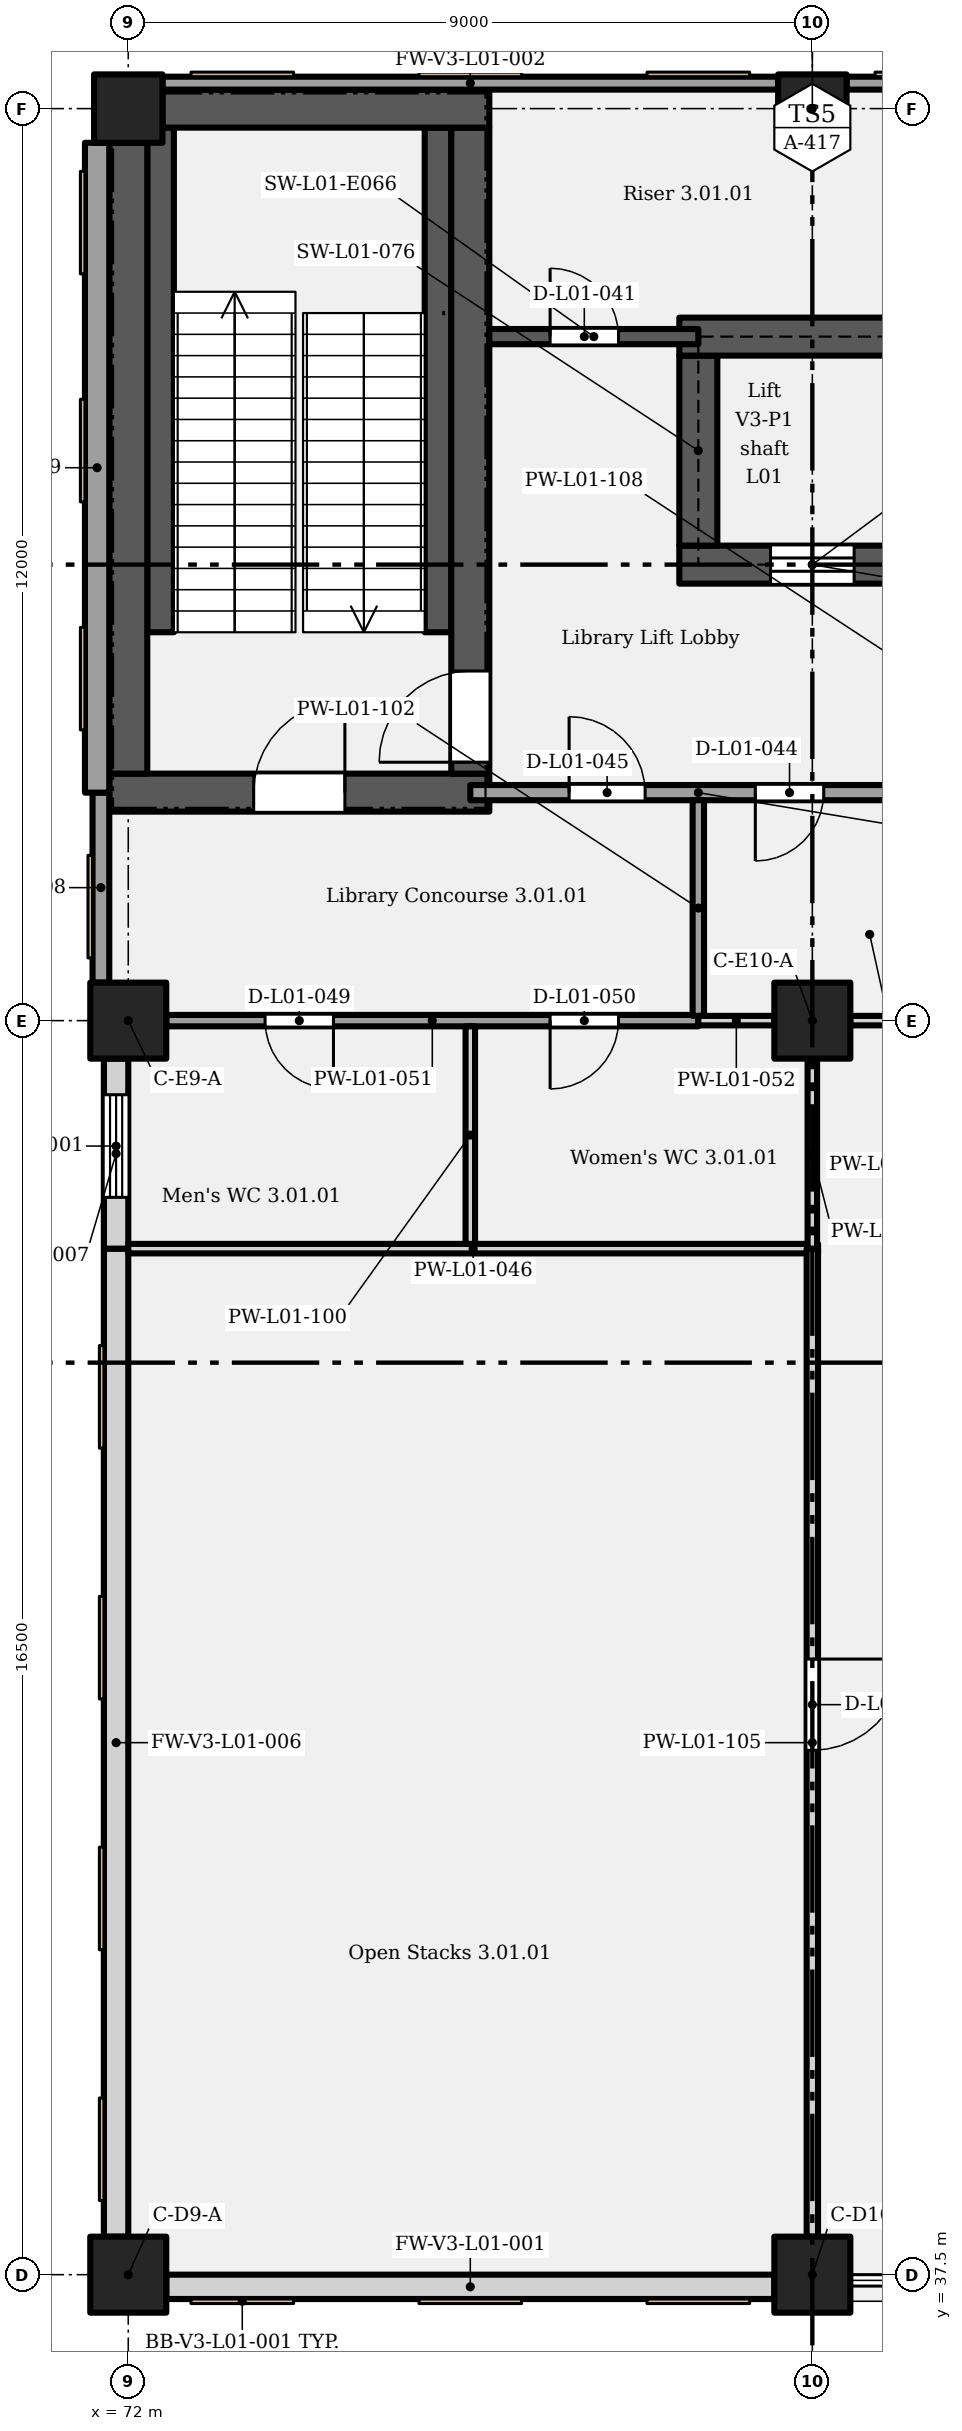
"""IFC4 building model, lengths in metres.
Left out: names, types, materials, properties, quantities, classifications, styles, units other than length and angle.
Written with IfcOpenShell. Run it as: python <this file> out.ifc"""

import sys

from ifc_helpers import new_model, si_unit, direction, frame, frame_2d, origin, origin_2d, place, context, subcontext, project, spatial, rectangle, extrude, element, fill, save


model = new_model("IFC4")
c1 = context("Model", 3, precision=1e-05, world=origin(), true_north=direction((0.0, 1.0)))
c2 = subcontext(c1, "Body", "Model", "MODEL_VIEW")
j1 = project(units=[si_unit("LENGTHUNIT", "METRE"), si_unit("PLANEANGLEUNIT", "RADIAN")], contexts=[c1])
p1 = place(None, origin())
s1 = spatial("IfcSite", under=j1, at=p1, CompositionType="ELEMENT")
p2 = place(p1, origin())
s2 = spatial("IfcBuilding", under=s1, at=p2, CompositionType="ELEMENT")
p3 = place(p2, frame((0.0, 0.0, 6.6)))
s3 = spatial("IfcBuildingStorey", under=s2, at=p3, CompositionType="ELEMENT", Elevation=6.6)
for number, where, z_axis, x_axis in (
    (1, (72.0, 37.5, 0.0), (0.0, 0.0, 1.0), (1.0, 0.0, 0.0)),
    (2, (81.0, 37.5, 0.0), (0.0, 0.0, 1.0), (1.0, 0.0, 0.0)),
    (3, (72.0, 54.0, 0.0), (0.0, 0.0, 1.0), (1.0, 0.0, 0.0)),
    (4, (81.0, 54.0, 0.0), (0.0, 0.0, 1.0), (1.0, 0.0, 0.0)),
):
    element("IfcColumn", number, at=place(p3, frame(where, z_axis=z_axis, x_axis=x_axis)), inside=s3, PredefinedType="COLUMN", context=c2, shape_type="SweptSolid", body=[
        extrude(rectangle(XDim=1.0, YDim=1.0, at=origin_2d()), origin(), (0.0, 0.0, 1.0), 5.4),
    ])
for number, where, z_axis, x_axis in (
    (5, (72.0, 66.0, 0.0), (0.0, 0.0, 1.0), (1.0, 0.0, 0.0)),
    (6, (81.0, 66.0, 0.0), (0.0, 0.0, 1.0), (1.0, 0.0, 0.0)),
):
    element("IfcColumn", number, at=place(p3, frame(where, z_axis=z_axis, x_axis=x_axis)), inside=s3, PredefinedType="COLUMN", context=c2, shape_type="SweptSolid", body=[
        extrude(rectangle(XDim=0.9, YDim=0.9, at=origin_2d()), origin(), (0.0, 0.0, 1.0), 5.4),
    ])
p4 = place(p3, frame((71.75, 57.0, 0.0), z_axis=(0.0, 0.0, 1.0), x_axis=(1.0, 0.0, 0.0)))
e7 = element("IfcWall", 7, at=p4, inside=s3, PredefinedType="SHEAR", context=c2, shape_type="SweptSolid", body=[
    extrude(rectangle(XDim=5.0, YDim=0.5, at=frame_2d((2.5, 0.0))), origin(), (0.0, 0.0, 1.0), 5.1),
])
p5 = place(p4, frame((1.9, 0.0, 0.0)))
e8 = element("IfcOpeningElement", 8, at=p5, cuts=e7, PredefinedType="OPENING", context=c2, shape_type="SweptSolid", body=[
    extrude(rectangle(XDim=1.2, YDim=2.1, at=frame_2d((0.6, 1.05))), frame((0.0, 0.26, 0.0), z_axis=(0.0, -1.0, 0.0), x_axis=(1.0, 0.0, 0.0)), (0.0, 0.0, 1.0), 0.52),
])
p6 = place(p3, frame((72.0, 57.25, 0.0), z_axis=(0.0, 0.0, 1.0), x_axis=(0.0, 1.0, 0.0)))
e9 = element("IfcWall", 9, at=p6, inside=s3, PredefinedType="SHEAR", context=c2, shape_type="SweptSolid", body=[
    extrude(rectangle(XDim=8.3, YDim=0.5, at=frame_2d((4.15, 0.0))), origin(), (0.0, 0.0, 1.0), 5.1),
])
p7 = place(p3, frame((76.5, 57.25, 0.0), z_axis=(0.0, 0.0, 1.0), x_axis=(0.0, 1.0, 0.0)))
e10 = element("IfcWall", 10, at=p7, inside=s3, PredefinedType="SHEAR", context=c2, shape_type="SweptSolid", body=[
    extrude(rectangle(XDim=8.5, YDim=0.5, at=frame_2d((4.25, 0.0))), origin(), (0.0, 0.0, 1.0), 5.1),
])
p8 = place(p7, frame((0.15, 0.0, 0.0)))
e11 = element("IfcOpeningElement", 11, at=p8, cuts=e10, PredefinedType="OPENING", context=c2, shape_type="SweptSolid", body=[
    extrude(rectangle(XDim=1.2, YDim=2.1, at=frame_2d((0.6, 1.05))), frame((0.0, 0.26, 0.0), z_axis=(0.0, -1.0, 0.0), x_axis=(1.0, 0.0, 0.0)), (0.0, 0.0, 1.0), 0.52),
])
p9 = place(p3, frame((79.25, 60.0, 0.0), z_axis=(0.0, 0.0, 1.0), x_axis=(1.0, 0.0, 0.0)))
e12 = element("IfcWall", 12, at=p9, inside=s3, PredefinedType="SHEAR", context=c2, shape_type="SweptSolid", body=[
    extrude(rectangle(XDim=3.5, YDim=0.5, at=frame_2d((1.75, 0.0))), origin(), (0.0, 0.0, 1.0), 5.1),
])
p10 = place(p9, frame((1.2, 0.0, 0.0)))
e13 = element("IfcOpeningElement", 13, at=p10, cuts=e12, PredefinedType="OPENING", context=c2, shape_type="SweptSolid", body=[
    extrude(rectangle(XDim=1.1, YDim=2.1, at=frame_2d((0.55, 1.05))), frame((0.0, 0.26, 0.0), z_axis=(0.0, -1.0, 0.0), x_axis=(1.0, 0.0, 0.0)), (0.0, 0.0, 1.0), 0.52),
])
p11 = place(p3, frame((79.5, 60.25, 0.0), z_axis=(0.0, 0.0, 1.0), x_axis=(0.0, 1.0, 0.0)))
e14 = element("IfcWall", 14, at=p11, inside=s3, PredefinedType="SHEAR", context=c2, shape_type="SweptSolid", body=[
    extrude(rectangle(XDim=2.5, YDim=0.5, at=frame_2d((1.25, 0.0))), origin(), (0.0, 0.0, 1.0), 5.1),
])
p12 = place(p3, frame((79.25, 63.0, 0.0), z_axis=(0.0, 0.0, 1.0), x_axis=(1.0, 0.0, 0.0)))
e15 = element("IfcWall", 15, at=p12, inside=s3, PredefinedType="SHEAR", context=c2, shape_type="SweptSolid", body=[
    extrude(rectangle(XDim=6.0, YDim=0.5, at=frame_2d((3.0, 0.0))), origin(), (0.0, 0.0, 1.0), 5.1),
])
p13 = place(p12, frame((4.2, 0.0, 0.0)))
e16 = element("IfcOpeningElement", 16, at=p13, cuts=e15, PredefinedType="OPENING", context=c2, shape_type="SweptSolid", body=[
    extrude(rectangle(XDim=1.1, YDim=2.1, at=frame_2d((0.55, 1.05))), frame((0.0, 0.26, 0.0), z_axis=(0.0, -1.0, 0.0), x_axis=(1.0, 0.0, 0.0)), (0.0, 0.0, 1.0), 0.52),
])
p14 = place(p3, frame((72.45, 66.0, 0.0), z_axis=(0.0, 0.0, 1.0), x_axis=(1.0, 0.0, 0.0)))
e17 = element("IfcWall", 17, at=p14, inside=s3, PredefinedType="SHEAR", context=c2, shape_type="SweptSolid", body=[
    extrude(rectangle(XDim=4.3, YDim=0.5, at=frame_2d((2.15, 0.0))), origin(), (0.0, 0.0, 1.0), 5.1),
])
p15 = place(p3, frame((72.5, 37.34, 0.0), z_axis=(0.0, 0.0, 1.0), x_axis=(1.0, 0.0, 0.0)))
e18 = element("IfcWall", 18, at=p15, inside=s3, PredefinedType="SOLIDWALL", context=c2, shape_type="SweptSolid", body=[
    extrude(rectangle(XDim=8.0, YDim=0.32, at=frame_2d((4.0, 0.0))), origin(), (0.0, 0.0, 1.0), 5.1),
])
for number, where, z_axis, x_axis in (
    (19, (72.45, 66.335, 0.0), (0.0, 0.0, 1.0), (1.0, 0.0, 0.0)),
    (20, (81.45, 66.335, 0.0), (0.0, 0.0, 1.0), (1.0, 0.0, 0.0)),
):
    element("IfcWall", number, at=place(p3, frame(where, z_axis=z_axis, x_axis=x_axis)), inside=s3, PredefinedType="SOLIDWALL", context=c2, shape_type="SweptSolid", body=[
        extrude(rectangle(XDim=8.1, YDim=0.17, at=frame_2d((4.05, 0.0))), origin(), (0.0, 0.0, 1.0), 5.1),
    ])
p16 = place(p3, frame((71.84, 38.0, 0.0), z_axis=(0.0, 0.0, 1.0), x_axis=(0.0, 1.0, 0.0)))
e21 = element("IfcWall", 21, at=p16, inside=s3, PredefinedType="SOLIDWALL", context=c2, shape_type="SweptSolid", body=[
    extrude(rectangle(XDim=13.0, YDim=0.32, at=frame_2d((6.5, 0.0))), origin(), (0.0, 0.0, 1.0), 5.1),
])
p17 = place(p3, frame((71.84, 51.0, 0.0), z_axis=(0.0, 0.0, 1.0), x_axis=(0.0, 1.0, 0.0)))
e22 = element("IfcWall", 22, at=p17, inside=s3, PredefinedType="SOLIDWALL", context=c2, shape_type="SweptSolid", body=[
    extrude(rectangle(XDim=2.5, YDim=0.32, at=frame_2d((1.25, 0.0))), origin(), (0.0, 0.0, 1.0), 5.1),
])
p18 = place(p17, frame((0.675, 0.0, 1.2)))
e23 = element("IfcOpeningElement", 23, at=p18, cuts=e22, PredefinedType="OPENING", context=c2, shape_type="SweptSolid", body=[
    extrude(rectangle(XDim=1.35, YDim=2.55, at=frame_2d((0.675, 1.275))), frame((0.0, 0.17, 0.0), z_axis=(0.0, -1.0, 0.0), x_axis=(1.0, 0.0, 0.0)), (0.0, 0.0, 1.0), 0.34),
])
p19 = place(p3, frame((71.64, 54.5, 0.0), z_axis=(0.0, 0.0, 1.0), x_axis=(0.0, 1.0, 0.0)))
e24 = element("IfcWall", 24, at=p19, inside=s3, PredefinedType="SOLIDWALL", context=c2, shape_type="SweptSolid", body=[
    extrude(rectangle(XDim=2.5, YDim=0.22, at=frame_2d((1.25, 0.0))), origin(), (0.0, 0.0, 1.0), 5.1),
])
p20 = place(p3, frame((71.59, 57.0, 0.0), z_axis=(0.0, 0.0, 1.0), x_axis=(0.0, 1.0, 0.0)))
e25 = element("IfcWall", 25, at=p20, inside=s3, PredefinedType="SOLIDWALL", context=c2, shape_type="SweptSolid", body=[
    extrude(rectangle(XDim=8.55, YDim=0.32, at=frame_2d((4.275, 0.0))), origin(), (0.0, 0.0, 1.0), 5.1),
])
p21 = place(p3, frame((72.0, 51.0, 0.0), z_axis=(0.0, 0.0, 1.0), x_axis=(1.0, 0.0, 0.0)))
e26 = element("IfcWall", 26, at=p21, inside=s3, PredefinedType="PARTITIONING", context=c2, shape_type="SweptSolid", body=[
    extrude(rectangle(XDim=9.075, YDim=0.125, at=frame_2d((4.538, 0.0))), origin(), (0.0, 0.0, 1.0), 5.1),
])
p22 = place(p3, frame((72.5, 54.0, 0.0), z_axis=(0.0, 0.0, 1.0), x_axis=(1.0, 0.0, 0.0)))
e27 = element("IfcWall", 27, at=p22, inside=s3, PredefinedType="PARTITIONING", context=c2, shape_type="SweptSolid", body=[
    extrude(rectangle(XDim=7.0, YDim=0.15, at=frame_2d((3.5, 0.0))), origin(), (0.0, 0.0, 1.0), 4.35),
])
p23 = place(p22, frame((2.2, 0.0, 0.0), z_axis=(0.0, 0.0, 1.0), x_axis=(-1.0, 0.0, 0.0)))
e28 = element("IfcOpeningElement", 28, at=p23, cuts=e27, PredefinedType="OPENING", context=c2, shape_type="SweptSolid", body=[
    extrude(rectangle(XDim=0.9, YDim=2.1, at=frame_2d((0.45, 1.05))), frame((0.0, 0.085, 0.0), z_axis=(0.0, -1.0, 0.0), x_axis=(1.0, 0.0, 0.0)), (0.0, 0.0, 1.0), 0.17),
])
p24 = place(p22, frame((5.95, 0.0, 0.0), z_axis=(0.0, 0.0, 1.0), x_axis=(-1.0, 0.0, 0.0)))
e29 = element("IfcOpeningElement", 29, at=p24, cuts=e27, PredefinedType="OPENING", context=c2, shape_type="SweptSolid", body=[
    extrude(rectangle(XDim=0.9, YDim=2.1, at=frame_2d((0.45, 1.05))), frame((0.0, 0.085, 0.0), z_axis=(0.0, -1.0, 0.0), x_axis=(1.0, 0.0, 0.0)), (0.0, 0.0, 1.0), 0.17),
])
for number, where, z_axis, x_axis in (
    (30, (79.5, 54.0, 0.0), (0.0, 0.0, 1.0), (1.0, 0.0, 0.0)),
    (31, (81.5, 54.0, 0.0), (0.0, 0.0, 1.0), (1.0, 0.0, 0.0)),
):
    element("IfcWall", number, at=place(p3, frame(where, z_axis=z_axis, x_axis=x_axis)), inside=s3, PredefinedType="PARTITIONING", context=c2, shape_type="SweptSolid", body=[
        extrude(rectangle(XDim=1.0, YDim=0.125, at=frame_2d((0.5, 0.0))), origin(), (0.0, 0.0, 1.0), 4.35),
    ])
p25 = place(p3, frame((76.5, 57.0, 0.0), z_axis=(0.0, 0.0, 1.0), x_axis=(1.0, 0.0, 0.0)))
e32 = element("IfcWall", 32, at=p25, inside=s3, PredefinedType="PARTITIONING", context=c2, shape_type="SweptSolid", body=[
    extrude(rectangle(XDim=6.0, YDim=0.2, at=frame_2d((3.0, 0.0))), origin(), (0.0, 0.0, 1.0), 5.1),
])
p26 = place(p25, frame((4.65, 0.0, 0.0), z_axis=(0.0, 0.0, 1.0), x_axis=(-1.0, 0.0, 0.0)))
e33 = element("IfcOpeningElement", 33, at=p26, cuts=e32, PredefinedType="OPENING", context=c2, shape_type="SweptSolid", body=[
    extrude(rectangle(XDim=0.9, YDim=2.1, at=frame_2d((0.45, 1.05))), frame((0.0, 0.11, 0.0), z_axis=(0.0, -1.0, 0.0), x_axis=(1.0, 0.0, 0.0)), (0.0, 0.0, 1.0), 0.22),
])
p27 = place(p25, frame((1.3, 0.0, 0.0)))
e34 = element("IfcOpeningElement", 34, at=p27, cuts=e32, PredefinedType="OPENING", context=c2, shape_type="SweptSolid", body=[
    extrude(rectangle(XDim=1.0, YDim=2.1, at=frame_2d((0.5, 1.05))), frame((0.0, 0.11, 0.0), z_axis=(0.0, -1.0, 0.0), x_axis=(1.0, 0.0, 0.0)), (0.0, 0.0, 1.0), 0.22),
])
p28 = place(p3, frame((76.75, 63.0, 0.0), z_axis=(0.0, 0.0, 1.0), x_axis=(1.0, 0.0, 0.0)))
e35 = element("IfcWall", 35, at=p28, inside=s3, PredefinedType="SHEAR", context=c2, shape_type="SweptSolid", body=[
    extrude(rectangle(XDim=2.75, YDim=0.2, at=frame_2d((1.375, 0.0))), origin(), (0.0, 0.0, 1.0), 5.1),
])
p29 = place(p28, frame((0.8, 0.0, 0.0)))
e36 = element("IfcOpeningElement", 36, at=p29, cuts=e35, PredefinedType="OPENING", context=c2, shape_type="SweptSolid", body=[
    extrude(rectangle(XDim=0.9, YDim=2.0, at=frame_2d((0.45, 1.0))), frame((0.0, 0.11, 0.0), z_axis=(0.0, -1.0, 0.0), x_axis=(1.0, 0.0, 0.0)), (0.0, 0.0, 1.0), 0.22),
])
p30 = place(p3, frame((76.5, 51.062, 0.0), z_axis=(0.0, 0.0, 1.0), x_axis=(0.0, 1.0, 0.0)))
e37 = element("IfcWall", 37, at=p30, inside=s3, PredefinedType="PARTITIONING", context=c2, shape_type="SweptSolid", body=[
    extrude(rectangle(XDim=2.863, YDim=0.125, at=frame_2d((1.431, 0.0))), origin(), (0.0, 0.0, 1.0), 5.1),
])
p31 = place(p3, frame((79.5, 54.062, 0.0), z_axis=(0.0, 0.0, 1.0), x_axis=(0.0, 1.0, 0.0)))
e38 = element("IfcWall", 38, at=p31, inside=s3, PredefinedType="PARTITIONING", context=c2, shape_type="SweptSolid", body=[
    extrude(rectangle(XDim=2.837, YDim=0.15, at=frame_2d((1.419, 0.0))), origin(), (0.0, 0.0, 1.0), 5.1),
])
p32 = place(p3, frame((81.0, 38.0, 0.0), z_axis=(0.0, 0.0, 1.0), x_axis=(0.0, 1.0, 0.0)))
e39 = element("IfcWall", 39, at=p32, inside=s3, PredefinedType="PARTITIONING", context=c2, shape_type="SweptSolid", body=[
    extrude(rectangle(XDim=13.0, YDim=0.15, at=frame_2d((6.5, 0.0))), origin(), (0.0, 0.0, 1.0), 4.15),
])
p33 = place(p32, frame((7.6, 0.0, 0.0), z_axis=(0.0, 0.0, 1.0), x_axis=(-1.0, 0.0, 0.0)))
e40 = element("IfcOpeningElement", 40, at=p33, cuts=e39, PredefinedType="OPENING", context=c2, shape_type="SweptSolid", body=[
    extrude(rectangle(XDim=1.2, YDim=2.4, at=frame_2d((0.6, 1.2))), frame((0.0, 0.085, 0.0), z_axis=(0.0, -1.0, 0.0), x_axis=(1.0, 0.0, 0.0)), (0.0, 0.0, 1.0), 0.17),
])
p34 = place(p3, frame((81.0, 51.0, 0.0), z_axis=(0.0, 0.0, 1.0), x_axis=(0.0, 1.0, 0.0)))
e41 = element("IfcWall", 41, at=p34, inside=s3, PredefinedType="PARTITIONING", context=c2, shape_type="SweptSolid", body=[
    extrude(rectangle(XDim=2.5, YDim=0.125, at=frame_2d((1.25, 0.0))), origin(), (0.0, 0.0, 1.0), 4.15),
])
p35 = place(p3, frame((72.425, 59.11, 0.0), z_axis=(0.0, 0.0, 1.0), x_axis=(0.0, 1.0, 0.0)))
e42 = element("IfcWall", 42, at=p35, inside=s3, PredefinedType="SHEAR", context=c2, shape_type="SweptSolid", body=[
    extrude(rectangle(XDim=6.64, YDim=0.35, at=frame_2d((3.32, 0.0))), origin(), (0.0, 0.0, 1.0), 5.1),
])
p36 = place(p3, frame((76.075, 59.11, 0.0), z_axis=(0.0, 0.0, 1.0), x_axis=(0.0, 1.0, 0.0)))
e43 = element("IfcWall", 43, at=p36, inside=s3, PredefinedType="SHEAR", context=c2, shape_type="SweptSolid", body=[
    extrude(rectangle(XDim=6.64, YDim=0.35, at=frame_2d((3.32, 0.0))), origin(), (0.0, 0.0, 1.0), 2.587),
])
p37 = place(p18, origin())
e44 = element("IfcWindow", 44, at=p37, inside=s3, PartitioningType="SINGLE_PANEL", PredefinedType="WINDOW", context=c2, shape_type="SweptSolid", body=[
    extrude(rectangle(XDim=1.35, YDim=2.55, at=frame_2d((0.675, 1.275))), frame((0.0, 0.03, 0.0), z_axis=(0.0, -1.0, 0.0), x_axis=(1.0, 0.0, 0.0)), (0.0, 0.0, 1.0), 0.06),
])
fill(e23, e44)
p38 = place(p8, origin())
e45 = element("IfcDoor", 45, at=p38, inside=s3, OperationType="SINGLE_SWING_LEFT", PredefinedType="DOOR", context=c2, shape_type="SweptSolid", body=[
    extrude(rectangle(XDim=1.2, YDim=2.1, at=frame_2d((0.6, 1.05))), frame((0.0, 0.025, 0.0), z_axis=(0.0, -1.0, 0.0), x_axis=(1.0, 0.0, 0.0)), (0.0, 0.0, 1.0), 0.05),
])
fill(e11, e45)
p39 = place(p10, origin())
e46 = element("IfcDoor", 46, at=p39, inside=s3, OperationType="SLIDING_TO_LEFT", PredefinedType="DOOR", context=c2, shape_type="SweptSolid", body=[
    extrude(rectangle(XDim=1.1, YDim=2.1, at=frame_2d((0.55, 1.05))), frame((0.0, 0.025, 0.0), z_axis=(0.0, -1.0, 0.0), x_axis=(1.0, 0.0, 0.0)), (0.0, 0.0, 1.0), 0.05),
])
fill(e13, e46)
p40 = place(p29, origin())
e47 = element("IfcDoor", 47, at=p40, inside=s3, OperationType="SINGLE_SWING_LEFT", PredefinedType="DOOR", context=c2, shape_type="SweptSolid", body=[
    extrude(rectangle(XDim=0.9, YDim=2.0, at=frame_2d((0.45, 1.0))), frame((0.0, 0.025, 0.0), z_axis=(0.0, -1.0, 0.0), x_axis=(1.0, 0.0, 0.0)), (0.0, 0.0, 1.0), 0.05),
])
fill(e36, e47)
p41 = place(p26, origin())
e48 = element("IfcDoor", 48, at=p41, inside=s3, OperationType="SINGLE_SWING_RIGHT", PredefinedType="DOOR", context=c2, shape_type="SweptSolid", body=[
    extrude(rectangle(XDim=0.9, YDim=2.1, at=frame_2d((0.45, 1.05))), frame((0.0, 0.025, 0.0), z_axis=(0.0, -1.0, 0.0), x_axis=(1.0, 0.0, 0.0)), (0.0, 0.0, 1.0), 0.05),
])
fill(e33, e48)
p42 = place(p27, origin())
e49 = element("IfcDoor", 49, at=p42, inside=s3, OperationType="SINGLE_SWING_LEFT", PredefinedType="DOOR", context=c2, shape_type="SweptSolid", body=[
    extrude(rectangle(XDim=1.0, YDim=2.1, at=frame_2d((0.5, 1.05))), frame((0.0, 0.025, 0.0), z_axis=(0.0, -1.0, 0.0), x_axis=(1.0, 0.0, 0.0)), (0.0, 0.0, 1.0), 0.05),
])
fill(e34, e49)
p43 = place(p5, origin())
e50 = element("IfcDoor", 50, at=p43, inside=s3, OperationType="SINGLE_SWING_RIGHT", PredefinedType="DOOR", context=c2, shape_type="SweptSolid", body=[
    extrude(rectangle(XDim=1.2, YDim=2.1, at=frame_2d((0.6, 1.05))), frame((0.0, 0.025, 0.0), z_axis=(0.0, -1.0, 0.0), x_axis=(1.0, 0.0, 0.0)), (0.0, 0.0, 1.0), 0.05),
])
fill(e8, e50)
p44 = place(p23, origin())
e51 = element("IfcDoor", 51, at=p44, inside=s3, OperationType="SINGLE_SWING_LEFT", PredefinedType="DOOR", context=c2, shape_type="SweptSolid", body=[
    extrude(rectangle(XDim=0.9, YDim=2.1, at=frame_2d((0.45, 1.05))), frame((0.0, 0.025, 0.0), z_axis=(0.0, -1.0, 0.0), x_axis=(1.0, 0.0, 0.0)), (0.0, 0.0, 1.0), 0.05),
])
fill(e28, e51)
p45 = place(p24, origin())
e52 = element("IfcDoor", 52, at=p45, inside=s3, OperationType="SINGLE_SWING_RIGHT", PredefinedType="DOOR", context=c2, shape_type="SweptSolid", body=[
    extrude(rectangle(XDim=0.9, YDim=2.1, at=frame_2d((0.45, 1.05))), frame((0.0, 0.025, 0.0), z_axis=(0.0, -1.0, 0.0), x_axis=(1.0, 0.0, 0.0)), (0.0, 0.0, 1.0), 0.05),
])
fill(e29, e52)
p46 = place(p33, origin())
e53 = element("IfcDoor", 53, at=p46, inside=s3, OperationType="SINGLE_SWING_LEFT", PredefinedType="DOOR", context=c2, shape_type="SweptSolid", body=[
    extrude(rectangle(XDim=1.2, YDim=2.4, at=frame_2d((0.6, 1.2))), frame((0.0, 0.025, 0.0), z_axis=(0.0, -1.0, 0.0), x_axis=(1.0, 0.0, 0.0)), (0.0, 0.0, 1.0), 0.05),
])
fill(e40, e53)
save(model, sys.argv[1])
